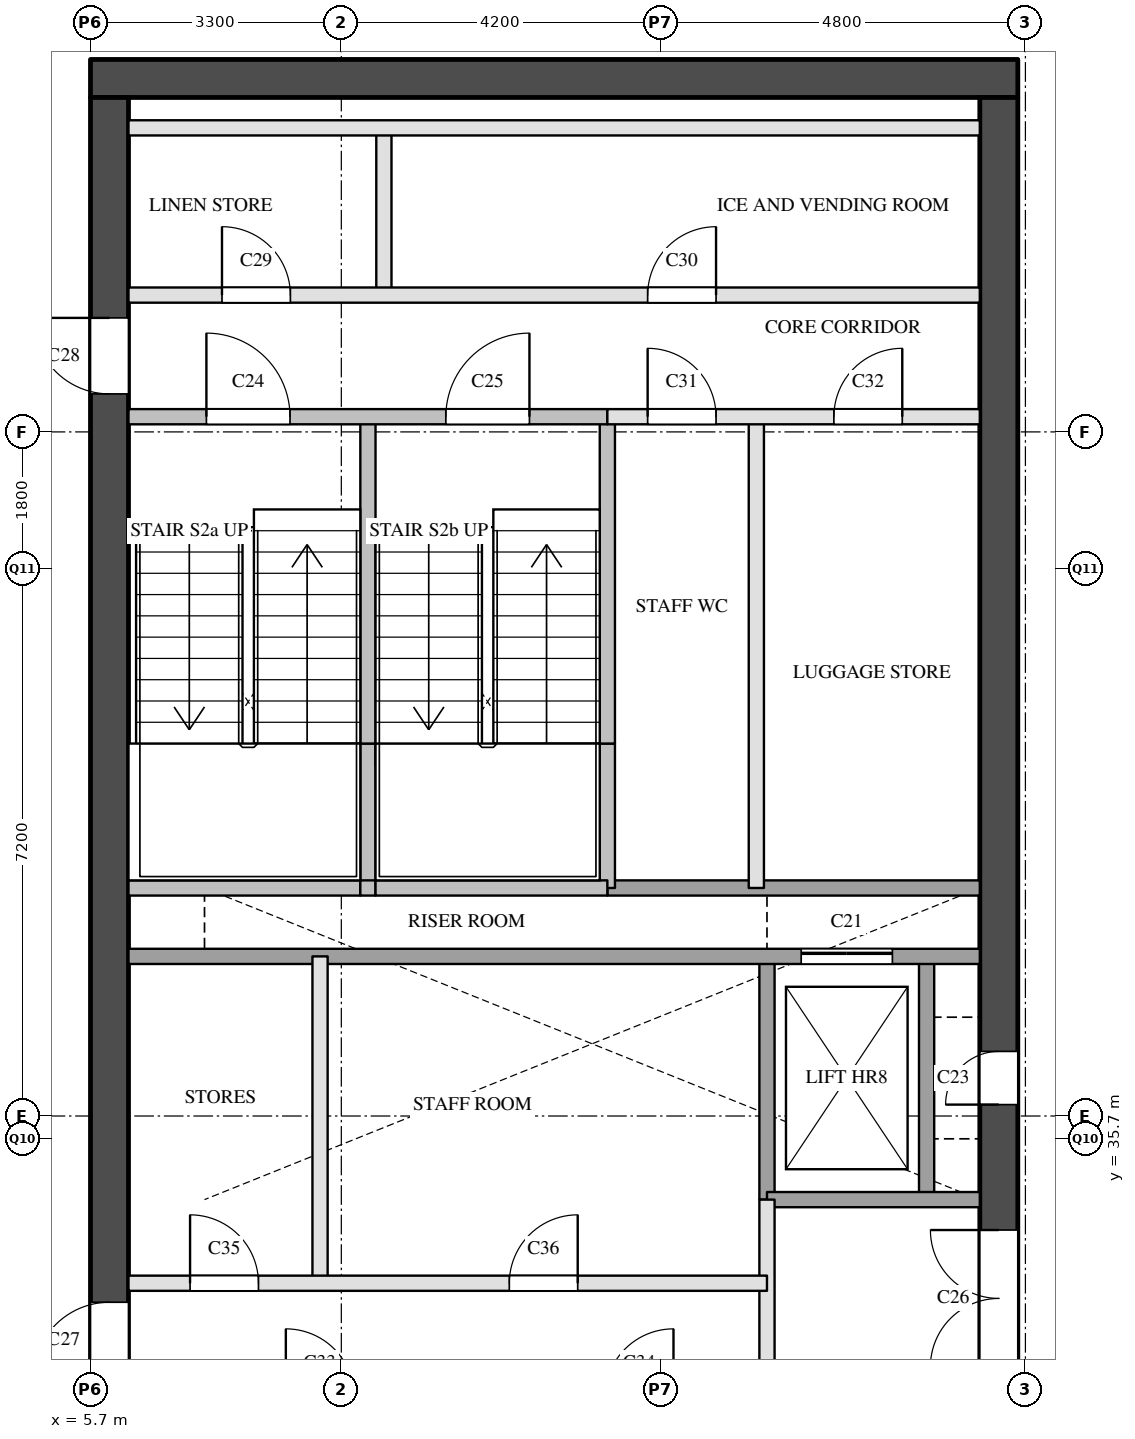
"""IFC4 building model, lengths in metres.
Left out: names, types, materials, properties, quantities, classifications, styles, units other than length and angle.
Written with IfcOpenShell. Run it as: python <this file> out.ifc"""

import sys

from ifc_helpers import new_model, si_unit, direction, frame, frame_2d, origin, place, context, subcontext, project, spatial, rectangle, extrude, element, fill, save


model = new_model("IFC4")
c1 = context("Model", 3, precision=1e-05, world=origin(), true_north=direction((0.0, 1.0)))
c2 = subcontext(c1, "Body", "Model", "MODEL_VIEW")
j1 = project(units=[si_unit("LENGTHUNIT", "METRE"), si_unit("PLANEANGLEUNIT", "RADIAN")], contexts=[c1])
p1 = place(None, origin())
s1 = spatial("IfcSite", under=j1, at=p1, CompositionType="ELEMENT")
p2 = place(p1, origin())
s2 = spatial("IfcBuilding", under=s1, at=p2, CompositionType="ELEMENT")
p3 = place(p2, frame((0.0, 0.0, 150.5)))
s3 = spatial("IfcBuildingStorey", under=s2, at=p3, CompositionType="ELEMENT", Elevation=150.5)
p4 = place(p3, frame((5.7, 49.65, 0.0), z_axis=(0.0, 0.0, 1.0), x_axis=(1.0, 0.0, 0.0)))
e1 = element("IfcWall", 1, at=p4, inside=s3, PredefinedType="SHEAR", context=c2, shape_type="SweptSolid", body=[
    extrude(rectangle(XDim=12.2, YDim=0.5, at=frame_2d((6.1, 0.0))), origin(), (0.0, 0.0, 1.0), 3.6),
])
p5 = place(p3, frame((5.95, 29.1, 0.0), z_axis=(0.0, 0.0, 1.0), x_axis=(0.0, 1.0, 0.0)))
e2 = element("IfcWall", 2, at=p5, inside=s3, PredefinedType="SHEAR", context=c2, shape_type="SweptSolid", body=[
    extrude(rectangle(XDim=20.3, YDim=0.5, at=frame_2d((10.15, 0.0))), origin(), (0.0, 0.0, 1.0), 3.6),
])
p6 = place(p5, frame((3.45, 0.0, 0.0)))
e3 = element("IfcOpeningElement", 3, at=p6, cuts=e2, PredefinedType="OPENING", context=c2, shape_type="SweptSolid", body=[
    extrude(rectangle(XDim=1.0, YDim=2.1, at=frame_2d((0.5, 1.05))), frame((0.0, 0.26, 0.0), z_axis=(0.0, -1.0, 0.0), x_axis=(1.0, 0.0, 0.0)), (0.0, 0.0, 1.0), 0.52),
])
p7 = place(p5, frame((16.4, 0.0, 0.0)))
e4 = element("IfcOpeningElement", 4, at=p7, cuts=e2, PredefinedType="OPENING", context=c2, shape_type="SweptSolid", body=[
    extrude(rectangle(XDim=1.0, YDim=2.1, at=frame_2d((0.5, 1.05))), frame((0.0, 0.26, 0.0), z_axis=(0.0, -1.0, 0.0), x_axis=(1.0, 0.0, 0.0)), (0.0, 0.0, 1.0), 0.52),
])
p8 = place(p3, frame((17.65, 29.1, 0.0), z_axis=(0.0, 0.0, 1.0), x_axis=(0.0, 1.0, 0.0)))
e5 = element("IfcWall", 5, at=p8, inside=s3, PredefinedType="SHEAR", context=c2, shape_type="SweptSolid", body=[
    extrude(rectangle(XDim=20.3, YDim=0.5, at=frame_2d((10.15, 0.0))), origin(), (0.0, 0.0, 1.0), 3.6),
])
p9 = place(p8, frame((1.25, 0.0, 0.0)))
e6 = element("IfcOpeningElement", 6, at=p9, cuts=e5, PredefinedType="OPENING", context=c2, shape_type="SweptSolid", body=[
    extrude(rectangle(XDim=0.7, YDim=2.1, at=frame_2d((0.35, 1.05))), frame((0.0, 0.26, 0.0), z_axis=(0.0, -1.0, 0.0), x_axis=(1.0, 0.0, 0.0)), (0.0, 0.0, 1.0), 0.52),
])
p10 = place(p8, frame((7.05, 0.0, 0.0)))
e7 = element("IfcOpeningElement", 7, at=p10, cuts=e5, PredefinedType="OPENING", context=c2, shape_type="SweptSolid", body=[
    extrude(rectangle(XDim=0.7, YDim=2.1, at=frame_2d((0.35, 1.05))), frame((0.0, 0.26, 0.0), z_axis=(0.0, -1.0, 0.0), x_axis=(1.0, 0.0, 0.0)), (0.0, 0.0, 1.0), 0.52),
])
p11 = place(p8, frame((3.6, 0.0, 0.0)))
e8 = element("IfcOpeningElement", 8, at=p11, cuts=e5, PredefinedType="OPENING", context=c2, shape_type="SweptSolid", body=[
    extrude(rectangle(XDim=1.8, YDim=2.1, at=frame_2d((0.9, 1.05))), frame((0.0, 0.26, 0.0), z_axis=(0.0, -1.0, 0.0), x_axis=(1.0, 0.0, 0.0)), (0.0, 0.0, 1.0), 0.52),
])
p12 = place(p3, frame((8.72, 33.8, 0.0), z_axis=(0.0, 0.0, 1.0), x_axis=(0.0, 1.0, 0.0)))
e9 = element("IfcWall", 9, at=p12, inside=s3, PredefinedType="PARTITIONING", context=c2, shape_type="SweptSolid", body=[
    extrude(rectangle(XDim=4.3, YDim=0.2, at=frame_2d((2.15, 0.0))), origin(), (0.0, 0.0, 1.0), 3.6),
])
p13 = place(p3, frame((9.35, 39.0, 0.0), z_axis=(0.0, 0.0, 1.0), x_axis=(0.0, 1.0, 0.0)))
e10 = element("IfcWall", 10, at=p13, inside=s3, PredefinedType="SOLIDWALL", context=c2, shape_type="SweptSolid", body=[
    extrude(rectangle(XDim=1.9, YDim=0.2, at=frame_2d((0.95, 0.0))), origin(), (0.0, 0.0, 1.0), 3.6),
])
p14 = place(p3, frame((9.35, 40.9, 0.0), z_axis=(0.0, 0.0, 1.0), x_axis=(0.0, 1.0, 0.0)))
e11 = element("IfcWall", 11, at=p14, inside=s3, PredefinedType="SOLIDWALL", context=c2, shape_type="SweptSolid", body=[
    extrude(rectangle(XDim=4.3, YDim=0.2, at=frame_2d((2.15, 0.0))), origin(), (0.0, 0.0, 1.0), 3.6),
])
p15 = place(p3, frame((9.56, 46.8, 0.0), z_axis=(0.0, 0.0, 1.0), x_axis=(0.0, 1.0, 0.0)))
e12 = element("IfcWall", 12, at=p15, inside=s3, PredefinedType="PARTITIONING", context=c2, shape_type="SweptSolid", body=[
    extrude(rectangle(XDim=2.2, YDim=0.2, at=frame_2d((1.1, 0.0))), origin(), (0.0, 0.0, 1.0), 3.6),
])
p16 = place(p3, frame((12.5, 39.0, 0.0), z_axis=(0.0, 0.0, 1.0), x_axis=(0.0, 1.0, 0.0)))
e13 = element("IfcWall", 13, at=p16, inside=s3, PredefinedType="SOLIDWALL", context=c2, shape_type="SweptSolid", body=[
    extrude(rectangle(XDim=1.9, YDim=0.2, at=frame_2d((0.95, 0.0))), origin(), (0.0, 0.0, 1.0), 3.6),
])
p17 = place(p3, frame((12.5, 40.9, 0.0), z_axis=(0.0, 0.0, 1.0), x_axis=(0.0, 1.0, 0.0)))
e14 = element("IfcWall", 14, at=p17, inside=s3, PredefinedType="SOLIDWALL", context=c2, shape_type="SweptSolid", body=[
    extrude(rectangle(XDim=4.3, YDim=0.2, at=frame_2d((2.15, 0.0))), origin(), (0.0, 0.0, 1.0), 3.6),
])
p18 = place(p3, frame((14.46, 39.0, 0.0), z_axis=(0.0, 0.0, 1.0), x_axis=(0.0, 1.0, 0.0)))
e15 = element("IfcWall", 15, at=p18, inside=s3, PredefinedType="PARTITIONING", context=c2, shape_type="SweptSolid", body=[
    extrude(rectangle(XDim=6.2, YDim=0.2, at=frame_2d((3.1, 0.0))), origin(), (0.0, 0.0, 1.0), 3.6),
])
p19 = place(p3, frame((14.6, 32.3, 0.0), z_axis=(0.0, 0.0, 1.0), x_axis=(0.0, 1.0, 0.0)))
e16 = element("IfcWall", 16, at=p19, inside=s3, PredefinedType="PARTITIONING", context=c2, shape_type="SweptSolid", body=[
    extrude(rectangle(XDim=2.6, YDim=0.2, at=frame_2d((1.3, 0.0))), origin(), (0.0, 0.0, 1.0), 3.6),
])
for number, where, z_axis, x_axis in (
    (17, (14.6, 34.9, 0.0), (0.0, 0.0, 1.0), (0.0, 1.0, 0.0)),
    (18, (16.7, 34.9, 0.0), (0.0, 0.0, 1.0), (0.0, 1.0, 0.0)),
):
    element("IfcWall", number, at=place(p3, frame(where, z_axis=z_axis, x_axis=x_axis)), inside=s3, PredefinedType="SOLIDWALL", context=c2, shape_type="SweptSolid", body=[
        extrude(rectangle(XDim=3.2, YDim=0.2, at=frame_2d((1.6, 0.0))), origin(), (0.0, 0.0, 1.0), 3.6),
    ])
p20 = place(p3, frame((6.2, 33.8, 0.0), z_axis=(0.0, 0.0, 1.0), x_axis=(1.0, 0.0, 0.0)))
e19 = element("IfcWall", 19, at=p20, inside=s3, PredefinedType="PARTITIONING", context=c2, shape_type="SweptSolid", body=[
    extrude(rectangle(XDim=8.4, YDim=0.2, at=frame_2d((4.2, 0.0))), origin(), (0.0, 0.0, 1.0), 3.6),
])
p21 = place(p20, frame((0.81, 0.0, 0.0)))
e20 = element("IfcOpeningElement", 20, at=p21, cuts=e19, PredefinedType="OPENING", context=c2, shape_type="SweptSolid", body=[
    extrude(rectangle(XDim=0.9, YDim=2.1, at=frame_2d((0.45, 1.05))), frame((0.0, 0.11, 0.0), z_axis=(0.0, -1.0, 0.0), x_axis=(1.0, 0.0, 0.0)), (0.0, 0.0, 1.0), 0.22),
])
p22 = place(p20, frame((5.01, 0.0, 0.0)))
e21 = element("IfcOpeningElement", 21, at=p22, cuts=e19, PredefinedType="OPENING", context=c2, shape_type="SweptSolid", body=[
    extrude(rectangle(XDim=0.9, YDim=2.1, at=frame_2d((0.45, 1.05))), frame((0.0, 0.11, 0.0), z_axis=(0.0, -1.0, 0.0), x_axis=(1.0, 0.0, 0.0)), (0.0, 0.0, 1.0), 0.22),
])
p23 = place(p3, frame((14.6, 34.9, 0.0), z_axis=(0.0, 0.0, 1.0), x_axis=(1.0, 0.0, 0.0)))
e22 = element("IfcWall", 22, at=p23, inside=s3, PredefinedType="SOLIDWALL", context=c2, shape_type="SweptSolid", body=[
    extrude(rectangle(XDim=2.8, YDim=0.2, at=frame_2d((1.4, 0.0))), origin(), (0.0, 0.0, 1.0), 3.6),
])
p24 = place(p3, frame((6.2, 38.1, 0.0), z_axis=(0.0, 0.0, 1.0), x_axis=(1.0, 0.0, 0.0)))
e23 = element("IfcWall", 23, at=p24, inside=s3, PredefinedType="SOLIDWALL", context=c2, shape_type="SweptSolid", body=[
    extrude(rectangle(XDim=11.2, YDim=0.2, at=frame_2d((5.6, 0.0))), origin(), (0.0, 0.0, 1.0), 3.6),
])
p25 = place(p24, frame((8.85, 0.0, 0.0)))
e24 = element("IfcOpeningElement", 24, at=p25, cuts=e23, PredefinedType="OPENING", context=c2, shape_type="SweptSolid", body=[
    extrude(rectangle(XDim=1.2, YDim=2.1, at=frame_2d((0.6, 1.05))), frame((0.0, 0.11, 0.0), z_axis=(0.0, -1.0, 0.0), x_axis=(1.0, 0.0, 0.0)), (0.0, 0.0, 1.0), 0.22),
])
p26 = place(p3, frame((12.5, 39.0, 0.0), z_axis=(0.0, 0.0, 1.0), x_axis=(1.0, 0.0, 0.0)))
e25 = element("IfcWall", 25, at=p26, inside=s3, PredefinedType="SOLIDWALL", context=c2, shape_type="SweptSolid", body=[
    extrude(rectangle(XDim=4.9, YDim=0.2, at=frame_2d((2.45, 0.0))), origin(), (0.0, 0.0, 1.0), 3.6),
])
p27 = place(p3, frame((6.2, 39.0, 0.0), z_axis=(0.0, 0.0, 1.0), x_axis=(1.0, 0.0, 0.0)))
e26 = element("IfcWall", 26, at=p27, inside=s3, PredefinedType="SOLIDWALL", context=c2, shape_type="SweptSolid", body=[
    extrude(rectangle(XDim=3.05, YDim=0.2, at=frame_2d((1.525, 0.0))), origin(), (0.0, 0.0, 1.0), 3.6),
])
p28 = place(p3, frame((9.25, 39.0, 0.0), z_axis=(0.0, 0.0, 1.0), x_axis=(1.0, 0.0, 0.0)))
e27 = element("IfcWall", 27, at=p28, inside=s3, PredefinedType="SOLIDWALL", context=c2, shape_type="SweptSolid", body=[
    extrude(rectangle(XDim=0.2, YDim=0.2, at=frame_2d((0.1, 0.0))), origin(), (0.0, 0.0, 1.0), 3.6),
])
p29 = place(p3, frame((9.45, 39.0, 0.0), z_axis=(0.0, 0.0, 1.0), x_axis=(1.0, 0.0, 0.0)))
e28 = element("IfcWall", 28, at=p29, inside=s3, PredefinedType="SOLIDWALL", context=c2, shape_type="SweptSolid", body=[
    extrude(rectangle(XDim=3.05, YDim=0.2, at=frame_2d((1.525, 0.0))), origin(), (0.0, 0.0, 1.0), 3.6),
])
p30 = place(p3, frame((12.5, 45.2, 0.0), z_axis=(0.0, 0.0, 1.0), x_axis=(1.0, 0.0, 0.0)))
e29 = element("IfcWall", 29, at=p30, inside=s3, PredefinedType="PARTITIONING", context=c2, shape_type="SweptSolid", body=[
    extrude(rectangle(XDim=4.9, YDim=0.2, at=frame_2d((2.45, 0.0))), origin(), (0.0, 0.0, 1.0), 3.6),
])
p31 = place(p30, frame((0.53, 0.0, 0.0)))
e30 = element("IfcOpeningElement", 30, at=p31, cuts=e29, PredefinedType="OPENING", context=c2, shape_type="SweptSolid", body=[
    extrude(rectangle(XDim=0.9, YDim=2.1, at=frame_2d((0.45, 1.05))), frame((0.0, 0.11, 0.0), z_axis=(0.0, -1.0, 0.0), x_axis=(1.0, 0.0, 0.0)), (0.0, 0.0, 1.0), 0.22),
])
p32 = place(p30, frame((2.98, 0.0, 0.0)))
e31 = element("IfcOpeningElement", 31, at=p32, cuts=e29, PredefinedType="OPENING", context=c2, shape_type="SweptSolid", body=[
    extrude(rectangle(XDim=0.9, YDim=2.1, at=frame_2d((0.45, 1.05))), frame((0.0, 0.11, 0.0), z_axis=(0.0, -1.0, 0.0), x_axis=(1.0, 0.0, 0.0)), (0.0, 0.0, 1.0), 0.22),
])
p33 = place(p3, frame((6.2, 45.2, 0.0), z_axis=(0.0, 0.0, 1.0), x_axis=(1.0, 0.0, 0.0)))
e32 = element("IfcWall", 32, at=p33, inside=s3, PredefinedType="SOLIDWALL", context=c2, shape_type="SweptSolid", body=[
    extrude(rectangle(XDim=6.3, YDim=0.2, at=frame_2d((3.15, 0.0))), origin(), (0.0, 0.0, 1.0), 3.6),
])
p34 = place(p33, frame((1.025, 0.0, 0.0)))
e33 = element("IfcOpeningElement", 33, at=p34, cuts=e32, PredefinedType="OPENING", context=c2, shape_type="SweptSolid", body=[
    extrude(rectangle(XDim=1.1, YDim=2.1, at=frame_2d((0.55, 1.05))), frame((0.0, 0.11, 0.0), z_axis=(0.0, -1.0, 0.0), x_axis=(1.0, 0.0, 0.0)), (0.0, 0.0, 1.0), 0.22),
])
p35 = place(p33, frame((4.175, 0.0, 0.0)))
e34 = element("IfcOpeningElement", 34, at=p35, cuts=e32, PredefinedType="OPENING", context=c2, shape_type="SweptSolid", body=[
    extrude(rectangle(XDim=1.1, YDim=2.1, at=frame_2d((0.55, 1.05))), frame((0.0, 0.11, 0.0), z_axis=(0.0, -1.0, 0.0), x_axis=(1.0, 0.0, 0.0)), (0.0, 0.0, 1.0), 0.22),
])
p36 = place(p3, frame((6.2, 46.8, 0.0), z_axis=(0.0, 0.0, 1.0), x_axis=(1.0, 0.0, 0.0)))
e35 = element("IfcWall", 35, at=p36, inside=s3, PredefinedType="PARTITIONING", context=c2, shape_type="SweptSolid", body=[
    extrude(rectangle(XDim=11.2, YDim=0.2, at=frame_2d((5.6, 0.0))), origin(), (0.0, 0.0, 1.0), 3.6),
])
p37 = place(p36, frame((1.23, 0.0, 0.0)))
e36 = element("IfcOpeningElement", 36, at=p37, cuts=e35, PredefinedType="OPENING", context=c2, shape_type="SweptSolid", body=[
    extrude(rectangle(XDim=0.9, YDim=2.1, at=frame_2d((0.45, 1.05))), frame((0.0, 0.11, 0.0), z_axis=(0.0, -1.0, 0.0), x_axis=(1.0, 0.0, 0.0)), (0.0, 0.0, 1.0), 0.22),
])
p38 = place(p36, frame((6.83, 0.0, 0.0)))
e37 = element("IfcOpeningElement", 37, at=p38, cuts=e35, PredefinedType="OPENING", context=c2, shape_type="SweptSolid", body=[
    extrude(rectangle(XDim=0.9, YDim=2.1, at=frame_2d((0.45, 1.05))), frame((0.0, 0.11, 0.0), z_axis=(0.0, -1.0, 0.0), x_axis=(1.0, 0.0, 0.0)), (0.0, 0.0, 1.0), 0.22),
])
p39 = place(p3, frame((6.2, 49.0, 0.0), z_axis=(0.0, 0.0, 1.0), x_axis=(1.0, 0.0, 0.0)))
e38 = element("IfcWall", 38, at=p39, inside=s3, PredefinedType="PARTITIONING", context=c2, shape_type="SweptSolid", body=[
    extrude(rectangle(XDim=11.2, YDim=0.2, at=frame_2d((5.6, 0.0))), origin(), (0.0, 0.0, 1.0), 3.6),
])
p40 = place(p25, origin())
e39 = element("IfcDoor", 39, at=p40, inside=s3, OperationType="SLIDING_TO_LEFT", PredefinedType="DOOR", context=c2, shape_type="SweptSolid", body=[
    extrude(rectangle(XDim=1.2, YDim=2.1, at=frame_2d((0.6, 1.05))), frame((0.0, 0.025, 0.0), z_axis=(0.0, -1.0, 0.0), x_axis=(1.0, 0.0, 0.0)), (0.0, 0.0, 1.0), 0.05),
])
fill(e24, e39)
p41 = place(p10, origin())
e40 = element("IfcDoor", 40, at=p41, inside=s3, OperationType="SINGLE_SWING_LEFT", PredefinedType="DOOR", context=c2, shape_type="SweptSolid", body=[
    extrude(rectangle(XDim=0.7, YDim=2.1, at=frame_2d((0.35, 1.05))), frame((0.0, 0.025, 0.0), z_axis=(0.0, -1.0, 0.0), x_axis=(1.0, 0.0, 0.0)), (0.0, 0.0, 1.0), 0.05),
])
fill(e7, e40)
p42 = place(p34, origin())
e41 = element("IfcDoor", 41, at=p42, inside=s3, OperationType="SINGLE_SWING_LEFT", PredefinedType="DOOR", context=c2, shape_type="SweptSolid", body=[
    extrude(rectangle(XDim=1.1, YDim=2.1, at=frame_2d((0.55, 1.05))), frame((0.0, 0.025, 0.0), z_axis=(0.0, -1.0, 0.0), x_axis=(1.0, 0.0, 0.0)), (0.0, 0.0, 1.0), 0.05),
])
fill(e33, e41)
p43 = place(p35, origin())
e42 = element("IfcDoor", 42, at=p43, inside=s3, OperationType="SINGLE_SWING_RIGHT", PredefinedType="DOOR", context=c2, shape_type="SweptSolid", body=[
    extrude(rectangle(XDim=1.1, YDim=2.1, at=frame_2d((0.55, 1.05))), frame((0.0, 0.025, 0.0), z_axis=(0.0, -1.0, 0.0), x_axis=(1.0, 0.0, 0.0)), (0.0, 0.0, 1.0), 0.05),
])
fill(e34, e42)
p44 = place(p11, origin())
e43 = element("IfcDoor", 43, at=p44, inside=s3, OperationType="DOUBLE_DOOR_SINGLE_SWING", PredefinedType="DOOR", context=c2, shape_type="SweptSolid", body=[
    extrude(rectangle(XDim=1.8, YDim=2.1, at=frame_2d((0.9, 1.05))), frame((0.0, 0.025, 0.0), z_axis=(0.0, -1.0, 0.0), x_axis=(1.0, 0.0, 0.0)), (0.0, 0.0, 1.0), 0.05),
])
fill(e8, e43)
p45 = place(p6, origin())
e44 = element("IfcDoor", 44, at=p45, inside=s3, OperationType="SINGLE_SWING_LEFT", PredefinedType="DOOR", context=c2, shape_type="SweptSolid", body=[
    extrude(rectangle(XDim=1.0, YDim=2.1, at=frame_2d((0.5, 1.05))), frame((0.0, 0.025, 0.0), z_axis=(0.0, -1.0, 0.0), x_axis=(1.0, 0.0, 0.0)), (0.0, 0.0, 1.0), 0.05),
])
fill(e3, e44)
p46 = place(p7, origin())
e45 = element("IfcDoor", 45, at=p46, inside=s3, OperationType="SINGLE_SWING_RIGHT", PredefinedType="DOOR", context=c2, shape_type="SweptSolid", body=[
    extrude(rectangle(XDim=1.0, YDim=2.1, at=frame_2d((0.5, 1.05))), frame((0.0, 0.025, 0.0), z_axis=(0.0, -1.0, 0.0), x_axis=(1.0, 0.0, 0.0)), (0.0, 0.0, 1.0), 0.05),
])
fill(e4, e45)
p47 = place(p37, origin())
e46 = element("IfcDoor", 46, at=p47, inside=s3, OperationType="SINGLE_SWING_LEFT", PredefinedType="DOOR", context=c2, shape_type="SweptSolid", body=[
    extrude(rectangle(XDim=0.9, YDim=2.1, at=frame_2d((0.45, 1.05))), frame((0.0, 0.025, 0.0), z_axis=(0.0, -1.0, 0.0), x_axis=(1.0, 0.0, 0.0)), (0.0, 0.0, 1.0), 0.05),
])
fill(e36, e46)
p48 = place(p38, origin())
e47 = element("IfcDoor", 47, at=p48, inside=s3, OperationType="SINGLE_SWING_RIGHT", PredefinedType="DOOR", context=c2, shape_type="SweptSolid", body=[
    extrude(rectangle(XDim=0.9, YDim=2.1, at=frame_2d((0.45, 1.05))), frame((0.0, 0.025, 0.0), z_axis=(0.0, -1.0, 0.0), x_axis=(1.0, 0.0, 0.0)), (0.0, 0.0, 1.0), 0.05),
])
fill(e37, e47)
p49 = place(p31, origin())
e48 = element("IfcDoor", 48, at=p49, inside=s3, OperationType="SINGLE_SWING_LEFT", PredefinedType="DOOR", context=c2, shape_type="SweptSolid", body=[
    extrude(rectangle(XDim=0.9, YDim=2.1, at=frame_2d((0.45, 1.05))), frame((0.0, 0.025, 0.0), z_axis=(0.0, -1.0, 0.0), x_axis=(1.0, 0.0, 0.0)), (0.0, 0.0, 1.0), 0.05),
])
fill(e30, e48)
p50 = place(p32, origin())
e49 = element("IfcDoor", 49, at=p50, inside=s3, OperationType="SINGLE_SWING_RIGHT", PredefinedType="DOOR", context=c2, shape_type="SweptSolid", body=[
    extrude(rectangle(XDim=0.9, YDim=2.1, at=frame_2d((0.45, 1.05))), frame((0.0, 0.025, 0.0), z_axis=(0.0, -1.0, 0.0), x_axis=(1.0, 0.0, 0.0)), (0.0, 0.0, 1.0), 0.05),
])
fill(e31, e49)
p51 = place(p21, origin())
e50 = element("IfcDoor", 50, at=p51, inside=s3, OperationType="SINGLE_SWING_LEFT", PredefinedType="DOOR", context=c2, shape_type="SweptSolid", body=[
    extrude(rectangle(XDim=0.9, YDim=2.1, at=frame_2d((0.45, 1.05))), frame((0.0, 0.025, 0.0), z_axis=(0.0, -1.0, 0.0), x_axis=(1.0, 0.0, 0.0)), (0.0, 0.0, 1.0), 0.05),
])
fill(e20, e50)
p52 = place(p22, origin())
e51 = element("IfcDoor", 51, at=p52, inside=s3, OperationType="SINGLE_SWING_RIGHT", PredefinedType="DOOR", context=c2, shape_type="SweptSolid", body=[
    extrude(rectangle(XDim=0.9, YDim=2.1, at=frame_2d((0.45, 1.05))), frame((0.0, 0.025, 0.0), z_axis=(0.0, -1.0, 0.0), x_axis=(1.0, 0.0, 0.0)), (0.0, 0.0, 1.0), 0.05),
])
fill(e21, e51)
save(model, sys.argv[1])
